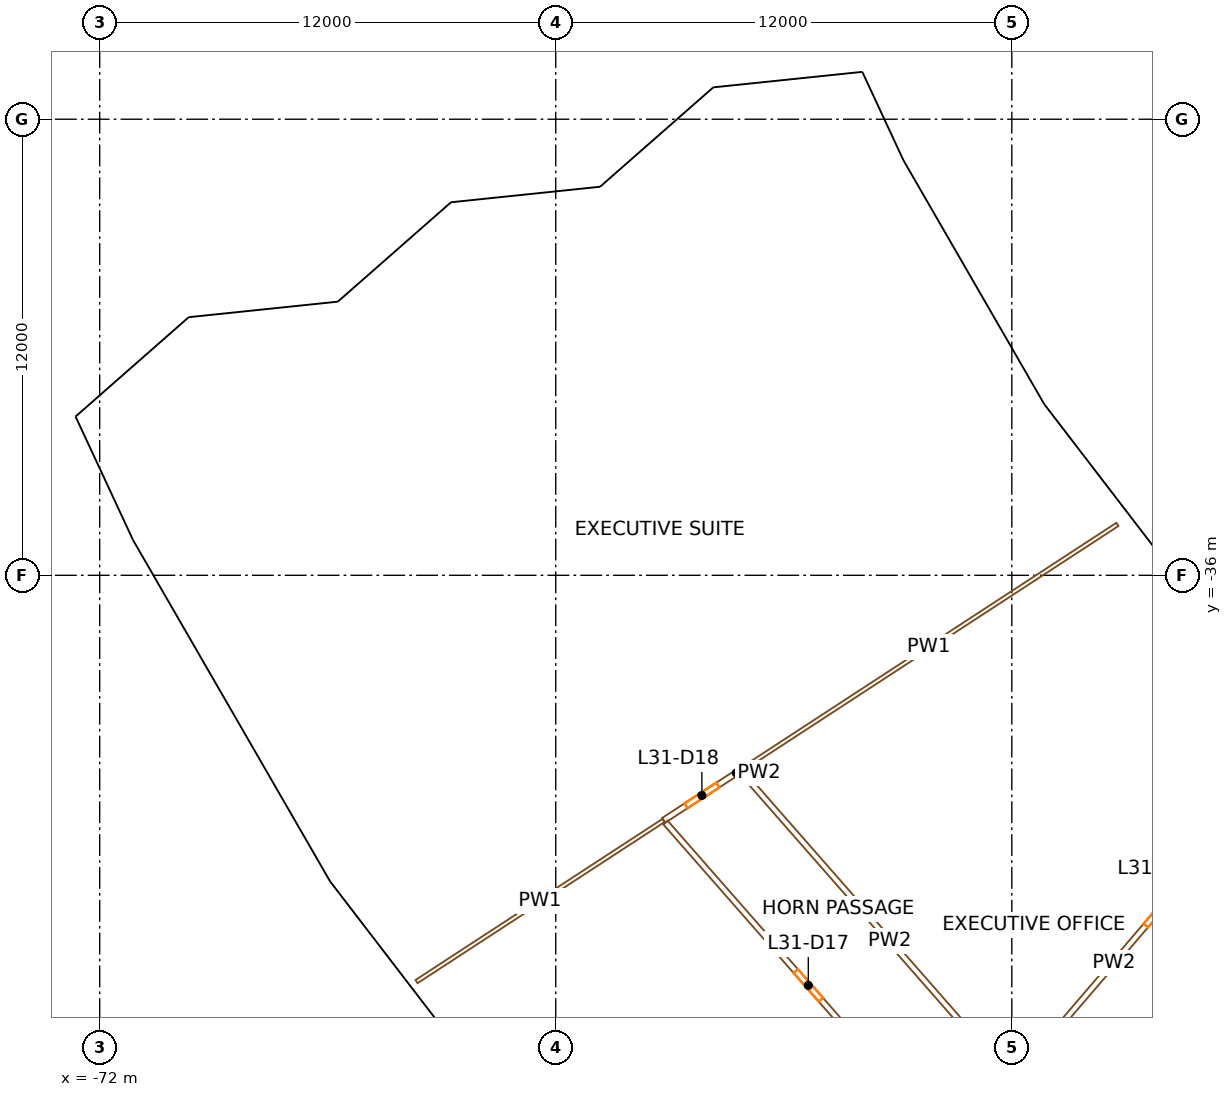
"""IFC4 building model, lengths in metres.
Left out: names, types, materials, properties, quantities, classifications, styles, units other than length and angle.
Written with IfcOpenShell. Run it as: python <this file> out.ifc"""

import sys

from ifc_helpers import new_model, si_unit, direction, frame, frame_2d, origin, origin_2d, place, context, subcontext, project, spatial, rectangle, extrude, element, fill, save


model = new_model("IFC4")
c1 = context("Model", 3, precision=1e-05, world=origin(), true_north=direction((0.0, 1.0)))
c2 = subcontext(c1, "Body", "Model", "MODEL_VIEW")
j1 = project(units=[si_unit("LENGTHUNIT", "METRE"), si_unit("PLANEANGLEUNIT", "RADIAN")], contexts=[c1])
p1 = place(None, origin())
s1 = spatial("IfcSite", under=j1, at=p1, CompositionType="ELEMENT")
p2 = place(p1, origin())
s2 = spatial("IfcBuilding", under=s1, at=p2, CompositionType="ELEMENT")
p3 = place(p2, frame((0.0, 0.0, 136.7)))
s3 = spatial("IfcBuildingStorey", under=s2, at=p3, CompositionType="ELEMENT", Elevation=136.7)
for number, where, z_axis, x_axis in (
    (1, (-52.243, -25.763, 0.0), (0.0, 0.0, 1.0), (0.442, -0.897, 0.0)),
    (2, (-69.732, -34.388, 0.0), (0.0, 0.0, 1.0), (0.442, -0.897, 0.0)),
    (3, (-48.433, -32.362, 0.0), (0.0, 0.0, 1.0), (0.556, -0.831, 0.0)),
    (4, (-64.647, -43.196, 0.0), (0.0, 0.0, 1.0), (0.556, -0.831, 0.0)),
    (5, (-43.795, -38.407, 0.0), (0.0, 0.0, 1.0), (0.659, -0.752, 0.0)),
):
    element("IfcColumn", number, at=place(p3, frame(where, z_axis=z_axis, x_axis=x_axis)), inside=s3, PredefinedType="COLUMN", context=c2, shape_type="SweptSolid", body=[
        extrude(rectangle(XDim=1.2, YDim=1.5, at=origin_2d()), origin(), (0.0, 0.0, 1.0), 3.8),
    ])
p4 = place(p3, frame((-49.779, -57.191, 0.0), z_axis=(0.0, 0.0, 1.0), x_axis=(0.573577477574, 0.819151315216, 0.0)))
e6 = element("IfcWall", 6, at=p4, inside=s3, PredefinedType="SHEAR", context=c2, shape_type="SweptSolid", body=[
    extrude(rectangle(XDim=14.8, YDim=0.9, at=frame_2d((7.4, 0.0))), origin(), (0.0, 0.0, 1.0), 3.5),
])
p5 = place(p4, frame((6.7, 0.0, 0.0)))
e7 = element("IfcOpeningElement", 7, at=p5, cuts=e6, PredefinedType="OPENING", context=c2, shape_type="SweptSolid", body=[
    extrude(rectangle(XDim=1.4, YDim=2.1, at=frame_2d((0.7, 1.05))), frame((0.0, 0.46, 0.0), z_axis=(0.0, -1.0, 0.0), x_axis=(1.0, 0.0, 0.0)), (0.0, 0.0, 1.0), 0.92),
])
p6 = place(p3, frame((-52.305, -22.994, 0.0), z_axis=(0.0, 0.0, 1.0), x_axis=(-0.99464222414, -0.103377202314, 0.0)))
e8 = element("IfcWall", 8, at=p6, inside=s3, PredefinedType="SOLIDWALL", context=c2, shape_type="SweptSolid", body=[
    extrude(rectangle(XDim=3.276, YDim=0.4, at=frame_2d((1.638, 0.0))), origin(), (0.0, 0.0, 1.0), 2.7),
])
p7 = place(p6, frame((0.638, 0.0, 0.9)))
e9 = element("IfcOpeningElement", 9, at=p7, cuts=e8, PredefinedType="OPENING", context=c2, shape_type="SweptSolid", body=[
    extrude(rectangle(XDim=2.0, YDim=1.425, at=frame_2d((1.0, 0.712))), frame((0.0, 0.21, 0.0), z_axis=(0.0, -1.0, 0.0), x_axis=(1.0, 0.0, 0.0)), (0.0, 0.0, 1.0), 0.42),
])
p8 = place(p3, frame((-55.684, -23.278, 0.0), z_axis=(0.0, 0.0, 1.0), x_axis=(-0.751508491951, -0.659723416687, 0.0)))
e10 = element("IfcWall", 10, at=p8, inside=s3, PredefinedType="SOLIDWALL", context=c2, shape_type="SweptSolid", body=[
    extrude(rectangle(XDim=4.195, YDim=0.4, at=frame_2d((2.097, 0.0))), origin(), (0.0, 0.0, 1.0), 2.7),
])
p9 = place(p8, frame((1.097, 0.0, 0.9)))
e11 = element("IfcOpeningElement", 11, at=p9, cuts=e10, PredefinedType="OPENING", context=c2, shape_type="SweptSolid", body=[
    extrude(rectangle(XDim=2.0, YDim=1.425, at=frame_2d((1.0, 0.712))), frame((0.0, 0.21, 0.0), z_axis=(0.0, -1.0, 0.0), x_axis=(1.0, 0.0, 0.0)), (0.0, 0.0, 1.0), 0.42),
])
p10 = place(p3, frame((-58.958, -25.991, 0.0), z_axis=(0.0, 0.0, 1.0), x_axis=(-0.994630744707, -0.103487591935, 0.0)))
e12 = element("IfcWall", 12, at=p10, inside=s3, PredefinedType="SOLIDWALL", context=c2, shape_type="SweptSolid", body=[
    extrude(rectangle(XDim=3.525, YDim=0.4, at=frame_2d((1.762, 0.0))), origin(), (0.0, 0.0, 1.0), 2.7),
])
p11 = place(p10, frame((0.762, 0.0, 0.9)))
e13 = element("IfcOpeningElement", 13, at=p11, cuts=e12, PredefinedType="OPENING", context=c2, shape_type="SweptSolid", body=[
    extrude(rectangle(XDim=2.0, YDim=1.425, at=frame_2d((1.0, 0.712))), frame((0.0, 0.21, 0.0), z_axis=(0.0, -1.0, 0.0), x_axis=(1.0, 0.0, 0.0)), (0.0, 0.0, 1.0), 0.42),
])
p12 = place(p3, frame((-62.586, -26.302, 0.0), z_axis=(0.0, 0.0, 1.0), x_axis=(-0.751443041403, -0.659797965689, 0.0)))
e14 = element("IfcWall", 14, at=p12, inside=s3, PredefinedType="SOLIDWALL", context=c2, shape_type="SweptSolid", body=[
    extrude(rectangle(XDim=4.193, YDim=0.4, at=frame_2d((2.097, 0.0))), origin(), (0.0, 0.0, 1.0), 2.7),
])
p13 = place(p12, frame((1.097, 0.0, 0.9)))
e15 = element("IfcOpeningElement", 15, at=p13, cuts=e14, PredefinedType="OPENING", context=c2, shape_type="SweptSolid", body=[
    extrude(rectangle(XDim=2.0, YDim=1.425, at=frame_2d((1.0, 0.712))), frame((0.0, 0.21, 0.0), z_axis=(0.0, -1.0, 0.0), x_axis=(1.0, 0.0, 0.0)), (0.0, 0.0, 1.0), 0.42),
])
p14 = place(p3, frame((-65.858, -29.014, 0.0), z_axis=(0.0, 0.0, 1.0), x_axis=(-0.994612311898, -0.103664598685, 0.0)))
e16 = element("IfcWall", 16, at=p14, inside=s3, PredefinedType="SOLIDWALL", context=c2, shape_type="SweptSolid", body=[
    extrude(rectangle(XDim=3.526, YDim=0.4, at=frame_2d((1.763, 0.0))), origin(), (0.0, 0.0, 1.0), 2.7),
])
p15 = place(p14, frame((0.763, 0.0, 0.9)))
e17 = element("IfcOpeningElement", 17, at=p15, cuts=e16, PredefinedType="OPENING", context=c2, shape_type="SweptSolid", body=[
    extrude(rectangle(XDim=2.0, YDim=1.425, at=frame_2d((1.0, 0.712))), frame((0.0, 0.21, 0.0), z_axis=(0.0, -1.0, 0.0), x_axis=(1.0, 0.0, 0.0)), (0.0, 0.0, 1.0), 0.42),
])
p16 = place(p3, frame((-69.487, -29.325, 0.0), z_axis=(0.0, 0.0, 1.0), x_axis=(-0.751426248615, -0.659817090482, 0.0)))
e18 = element("IfcWall", 18, at=p16, inside=s3, PredefinedType="SOLIDWALL", context=c2, shape_type="SweptSolid", body=[
    extrude(rectangle(XDim=4.013, YDim=0.4, at=frame_2d((2.007, 0.0))), origin(), (0.0, 0.0, 1.0), 2.7),
])
p17 = place(p16, frame((1.007, 0.0, 0.9)))
e19 = element("IfcOpeningElement", 19, at=p17, cuts=e18, PredefinedType="OPENING", context=c2, shape_type="SweptSolid", body=[
    extrude(rectangle(XDim=2.0, YDim=1.425, at=frame_2d((1.0, 0.712))), frame((0.0, 0.21, 0.0), z_axis=(0.0, -1.0, 0.0), x_axis=(1.0, 0.0, 0.0)), (0.0, 0.0, 1.0), 0.42),
])
p18 = place(p3, frame((-51.024, -25.184, 0.0), z_axis=(0.0, 0.0, 1.0), x_axis=(-0.421941591732, 0.906623016014, 0.0)))
e20 = element("IfcWall", 20, at=p18, inside=s3, PredefinedType="SOLIDWALL", context=c2, shape_type="SweptSolid", body=[
    extrude(rectangle(XDim=2.635, YDim=0.4, at=frame_2d((1.317, 0.0))), origin(), (0.0, 0.0, 1.0), 2.7),
])
p19 = place(p3, frame((-47.336, -31.568, 0.0), z_axis=(0.0, 0.0, 1.0), x_axis=(-0.499994443168, 0.866028611999, 0.0)))
e21 = element("IfcWall", 21, at=p19, inside=s3, PredefinedType="SOLIDWALL", context=c2, shape_type="SweptSolid", body=[
    extrude(rectangle(XDim=7.355, YDim=0.4, at=frame_2d((3.678, 0.0))), origin(), (0.0, 0.0, 1.0), 2.7),
])
p20 = place(p19, frame((4.225, 0.0, 0.9)))
e22 = element("IfcOpeningElement", 22, at=p20, cuts=e21, PredefinedType="OPENING", context=c2, shape_type="SweptSolid", body=[
    extrude(rectangle(XDim=2.6, YDim=1.65, at=frame_2d((1.3, 0.825))), frame((0.0, 0.21, 0.0), z_axis=(0.0, -1.0, 0.0), x_axis=(1.0, 0.0, 0.0)), (0.0, 0.0, 1.0), 0.42),
])
p21 = place(p19, frame((0.517, 0.0, 0.9)))
e23 = element("IfcOpeningElement", 23, at=p21, cuts=e21, PredefinedType="OPENING", context=c2, shape_type="SweptSolid", body=[
    extrude(rectangle(XDim=2.6, YDim=1.65, at=frame_2d((1.3, 0.825))), frame((0.0, 0.21, 0.0), z_axis=(0.0, -1.0, 0.0), x_axis=(1.0, 0.0, 0.0)), (0.0, 0.0, 1.0), 0.42),
])
p22 = place(p3, frame((-42.765, -37.537, 0.0), z_axis=(0.0, 0.0, 1.0), x_axis=(-0.608748204711, 0.793363487476, 0.0)))
e24 = element("IfcWall", 24, at=p22, inside=s3, PredefinedType="SOLIDWALL", context=c2, shape_type="SweptSolid", body=[
    extrude(rectangle(XDim=7.493, YDim=0.4, at=frame_2d((3.747, 0.0))), origin(), (0.0, 0.0, 1.0), 2.7),
])
p23 = place(p22, frame((4.301, 0.0, 0.9)))
e25 = element("IfcOpeningElement", 25, at=p23, cuts=e24, PredefinedType="OPENING", context=c2, shape_type="SweptSolid", body=[
    extrude(rectangle(XDim=2.6, YDim=1.65, at=frame_2d((1.3, 0.825))), frame((0.0, 0.21, 0.0), z_axis=(0.0, -1.0, 0.0), x_axis=(1.0, 0.0, 0.0)), (0.0, 0.0, 1.0), 0.42),
])
p24 = place(p22, frame((0.592, 0.0, 0.9)))
e26 = element("IfcOpeningElement", 26, at=p24, cuts=e24, PredefinedType="OPENING", context=c2, shape_type="SweptSolid", body=[
    extrude(rectangle(XDim=2.6, YDim=1.65, at=frame_2d((1.3, 0.825))), frame((0.0, 0.21, 0.0), z_axis=(0.0, -1.0, 0.0), x_axis=(1.0, 0.0, 0.0)), (0.0, 0.0, 1.0), 0.42),
])
p25 = place(p3, frame((-63.663, -46.691, 0.0), z_axis=(0.0, 0.0, 1.0), x_axis=(0.837558660213, 0.546347408433, 0.0)))
e27 = element("IfcWall", 27, at=p25, inside=s3, PredefinedType="PARTITIONING", context=c2, shape_type="SweptSolid", body=[
    extrude(rectangle(XDim=7.762, YDim=0.1, at=frame_2d((3.881, 0.0))), origin(), (0.0, 0.0, 1.0), 2.4),
])
p26 = place(p3, frame((-57.162, -42.45, 0.0), z_axis=(0.0, 0.0, 1.0), x_axis=(0.837554034944, 0.546354498974, 0.0)))
e28 = element("IfcWall", 28, at=p26, inside=s3, PredefinedType="PARTITIONING", context=c2, shape_type="SweptSolid", body=[
    extrude(rectangle(XDim=2.405, YDim=0.15, at=frame_2d((1.202, 0.0))), origin(), (0.0, 0.0, 1.0), 2.4),
])
p27 = place(p26, frame((0.702, 0.0, 0.0)))
e29 = element("IfcOpeningElement", 29, at=p27, cuts=e28, PredefinedType="OPENING", context=c2, shape_type="SweptSolid", body=[
    extrude(rectangle(XDim=1.0, YDim=2.1, at=frame_2d((0.5, 1.05))), frame((0.0, 0.085, 0.0), z_axis=(0.0, -1.0, 0.0), x_axis=(1.0, 0.0, 0.0)), (0.0, 0.0, 1.0), 0.17),
])
p28 = place(p3, frame((-55.148, -41.136, 0.0), z_axis=(0.0, 0.0, 1.0), x_axis=(0.837561412918, 0.546343188473, 0.0)))
e30 = element("IfcWall", 30, at=p28, inside=s3, PredefinedType="PARTITIONING", context=c2, shape_type="SweptSolid", body=[
    extrude(rectangle(XDim=11.851, YDim=0.1, at=frame_2d((5.925, 0.0))), origin(), (0.0, 0.0, 1.0), 2.4),
])
p29 = place(p3, frame((-49.597, -51.075, 0.0), z_axis=(0.0, 0.0, 1.0), x_axis=(-0.659347342495, 0.751838467987, 0.0)))
e31 = element("IfcWall", 31, at=p29, inside=s3, PredefinedType="PARTITIONING", context=c2, shape_type="SweptSolid", body=[
    extrude(rectangle(XDim=11.398, YDim=0.15, at=frame_2d((5.699, 0.0))), origin(), (0.0, 0.0, 1.0), 2.4),
])
p30 = place(p29, frame((5.199, 0.0, 0.0)))
e32 = element("IfcOpeningElement", 32, at=p30, cuts=e31, PredefinedType="OPENING", context=c2, shape_type="SweptSolid", body=[
    extrude(rectangle(XDim=1.0, YDim=2.1, at=frame_2d((0.5, 1.05))), frame((0.0, 0.085, 0.0), z_axis=(0.0, -1.0, 0.0), x_axis=(1.0, 0.0, 0.0)), (0.0, 0.0, 1.0), 0.17),
])
p31 = place(p3, frame((-48.032, -49.25, 0.0), z_axis=(0.0, 0.0, 1.0), x_axis=(-0.659337984036, 0.751846675066, 0.0)))
e33 = element("IfcWall", 33, at=p31, inside=s3, PredefinedType="PARTITIONING", context=c2, shape_type="SweptSolid", body=[
    extrude(rectangle(XDim=10.718, YDim=0.15, at=frame_2d((5.359, 0.0))), origin(), (0.0, 0.0, 1.0), 2.4),
])
p32 = place(p3, frame((-48.031, -49.364, 0.0), z_axis=(0.0, 0.0, 1.0), x_axis=(0.650981860867, 0.759093285982, 0.0)))
e34 = element("IfcWall", 34, at=p32, inside=s3, PredefinedType="PARTITIONING", context=c2, shape_type="SweptSolid", body=[
    extrude(rectangle(XDim=11.926, YDim=0.15, at=frame_2d((5.963, 0.0))), origin(), (0.0, 0.0, 1.0), 2.4),
])
p33 = place(p32, frame((5.463, 0.0, 0.0)))
e35 = element("IfcOpeningElement", 35, at=p33, cuts=e34, PredefinedType="OPENING", context=c2, shape_type="SweptSolid", body=[
    extrude(rectangle(XDim=1.0, YDim=2.1, at=frame_2d((0.5, 1.05))), frame((0.0, 0.085, 0.0), z_axis=(0.0, -1.0, 0.0), x_axis=(1.0, 0.0, 0.0)), (0.0, 0.0, 1.0), 0.17),
])
p34 = place(p20, origin())
e36 = element("IfcWindow", 36, at=p34, inside=s3, PartitioningType="SINGLE_PANEL", PredefinedType="WINDOW", context=c2, shape_type="SweptSolid", body=[
    extrude(rectangle(XDim=2.6, YDim=1.65, at=frame_2d((1.3, 0.825))), frame((0.0, 0.03, 0.0), z_axis=(0.0, -1.0, 0.0), x_axis=(1.0, 0.0, 0.0)), (0.0, 0.0, 1.0), 0.06),
])
fill(e22, e36)
p35 = place(p21, origin())
e37 = element("IfcWindow", 37, at=p35, inside=s3, PartitioningType="SINGLE_PANEL", PredefinedType="WINDOW", context=c2, shape_type="SweptSolid", body=[
    extrude(rectangle(XDim=2.6, YDim=1.65, at=frame_2d((1.3, 0.825))), frame((0.0, 0.03, 0.0), z_axis=(0.0, -1.0, 0.0), x_axis=(1.0, 0.0, 0.0)), (0.0, 0.0, 1.0), 0.06),
])
fill(e23, e37)
p36 = place(p23, origin())
e38 = element("IfcWindow", 38, at=p36, inside=s3, PartitioningType="SINGLE_PANEL", PredefinedType="WINDOW", context=c2, shape_type="SweptSolid", body=[
    extrude(rectangle(XDim=2.6, YDim=1.65, at=frame_2d((1.3, 0.825))), frame((0.0, 0.03, 0.0), z_axis=(0.0, -1.0, 0.0), x_axis=(1.0, 0.0, 0.0)), (0.0, 0.0, 1.0), 0.06),
])
fill(e25, e38)
p37 = place(p24, origin())
e39 = element("IfcWindow", 39, at=p37, inside=s3, PartitioningType="SINGLE_PANEL", PredefinedType="WINDOW", context=c2, shape_type="SweptSolid", body=[
    extrude(rectangle(XDim=2.6, YDim=1.65, at=frame_2d((1.3, 0.825))), frame((0.0, 0.03, 0.0), z_axis=(0.0, -1.0, 0.0), x_axis=(1.0, 0.0, 0.0)), (0.0, 0.0, 1.0), 0.06),
])
fill(e26, e39)
p38 = place(p7, origin())
e40 = element("IfcWindow", 40, at=p38, inside=s3, PartitioningType="SINGLE_PANEL", PredefinedType="WINDOW", context=c2, shape_type="SweptSolid", body=[
    extrude(rectangle(XDim=2.0, YDim=1.425, at=frame_2d((1.0, 0.712))), frame((0.0, 0.03, 0.0), z_axis=(0.0, -1.0, 0.0), x_axis=(1.0, 0.0, 0.0)), (0.0, 0.0, 1.0), 0.06),
])
fill(e9, e40)
p39 = place(p9, origin())
e41 = element("IfcWindow", 41, at=p39, inside=s3, PartitioningType="SINGLE_PANEL", PredefinedType="WINDOW", context=c2, shape_type="SweptSolid", body=[
    extrude(rectangle(XDim=2.0, YDim=1.425, at=frame_2d((1.0, 0.712))), frame((0.0, 0.03, 0.0), z_axis=(0.0, -1.0, 0.0), x_axis=(1.0, 0.0, 0.0)), (0.0, 0.0, 1.0), 0.06),
])
fill(e11, e41)
p40 = place(p11, origin())
e42 = element("IfcWindow", 42, at=p40, inside=s3, PartitioningType="SINGLE_PANEL", PredefinedType="WINDOW", context=c2, shape_type="SweptSolid", body=[
    extrude(rectangle(XDim=2.0, YDim=1.425, at=frame_2d((1.0, 0.712))), frame((0.0, 0.03, 0.0), z_axis=(0.0, -1.0, 0.0), x_axis=(1.0, 0.0, 0.0)), (0.0, 0.0, 1.0), 0.06),
])
fill(e13, e42)
p41 = place(p13, origin())
e43 = element("IfcWindow", 43, at=p41, inside=s3, PartitioningType="SINGLE_PANEL", PredefinedType="WINDOW", context=c2, shape_type="SweptSolid", body=[
    extrude(rectangle(XDim=2.0, YDim=1.425, at=frame_2d((1.0, 0.712))), frame((0.0, 0.03, 0.0), z_axis=(0.0, -1.0, 0.0), x_axis=(1.0, 0.0, 0.0)), (0.0, 0.0, 1.0), 0.06),
])
fill(e15, e43)
p42 = place(p15, origin())
e44 = element("IfcWindow", 44, at=p42, inside=s3, PartitioningType="SINGLE_PANEL", PredefinedType="WINDOW", context=c2, shape_type="SweptSolid", body=[
    extrude(rectangle(XDim=2.0, YDim=1.425, at=frame_2d((1.0, 0.712))), frame((0.0, 0.03, 0.0), z_axis=(0.0, -1.0, 0.0), x_axis=(1.0, 0.0, 0.0)), (0.0, 0.0, 1.0), 0.06),
])
fill(e17, e44)
p43 = place(p17, origin())
e45 = element("IfcWindow", 45, at=p43, inside=s3, PartitioningType="SINGLE_PANEL", PredefinedType="WINDOW", context=c2, shape_type="SweptSolid", body=[
    extrude(rectangle(XDim=2.0, YDim=1.425, at=frame_2d((1.0, 0.712))), frame((0.0, 0.03, 0.0), z_axis=(0.0, -1.0, 0.0), x_axis=(1.0, 0.0, 0.0)), (0.0, 0.0, 1.0), 0.06),
])
fill(e19, e45)
p44 = place(p33, origin())
e46 = element("IfcDoor", 46, at=p44, inside=s3, OperationType="SINGLE_SWING_RIGHT", PredefinedType="DOOR", context=c2, shape_type="SweptSolid", body=[
    extrude(rectangle(XDim=1.0, YDim=2.1, at=frame_2d((0.5, 1.05))), frame((0.0, 0.025, 0.0), z_axis=(0.0, -1.0, 0.0), x_axis=(1.0, 0.0, 0.0)), (0.0, 0.0, 1.0), 0.05),
])
fill(e35, e46)
p45 = place(p30, origin())
e47 = element("IfcDoor", 47, at=p45, inside=s3, OperationType="SINGLE_SWING_RIGHT", PredefinedType="DOOR", context=c2, shape_type="SweptSolid", body=[
    extrude(rectangle(XDim=1.0, YDim=2.1, at=frame_2d((0.5, 1.05))), frame((0.0, 0.025, 0.0), z_axis=(0.0, -1.0, 0.0), x_axis=(1.0, 0.0, 0.0)), (0.0, 0.0, 1.0), 0.05),
])
fill(e32, e47)
p46 = place(p27, origin())
e48 = element("IfcDoor", 48, at=p46, inside=s3, OperationType="SINGLE_SWING_RIGHT", PredefinedType="DOOR", context=c2, shape_type="SweptSolid", body=[
    extrude(rectangle(XDim=1.0, YDim=2.1, at=frame_2d((0.5, 1.05))), frame((0.0, 0.025, 0.0), z_axis=(0.0, -1.0, 0.0), x_axis=(1.0, 0.0, 0.0)), (0.0, 0.0, 1.0), 0.05),
])
fill(e29, e48)
save(model, sys.argv[1])
